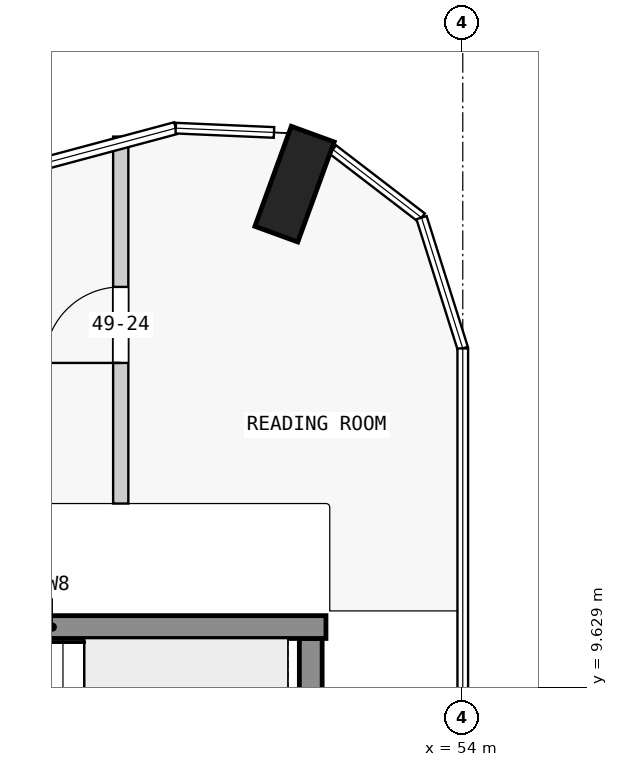
"""IFC4 building model, lengths in metres.
Left out: names, types, materials, properties, quantities, classifications, styles, units other than length and angle.
Written with IfcOpenShell. Run it as: python <this file> out.ifc"""

import sys

from ifc_helpers import new_model, si_unit, direction, frame, frame_2d, origin, origin_2d, place, context, subcontext, project, spatial, rectangle, extrude, element, fill, save


model = new_model("IFC4")
c1 = context("Model", 3, precision=1e-05, world=origin(), true_north=direction((0.0, 1.0)))
c2 = subcontext(c1, "Body", "Model", "MODEL_VIEW")
j1 = project(units=[si_unit("LENGTHUNIT", "METRE"), si_unit("PLANEANGLEUNIT", "RADIAN")], contexts=[c1])
p1 = place(None, origin())
s1 = spatial("IfcSite", under=j1, at=p1, CompositionType="ELEMENT")
p2 = place(p1, origin())
s2 = spatial("IfcBuilding", under=s1, at=p2, CompositionType="ELEMENT")
p3 = place(p2, frame((0.0, 0.0, 190.9)))
s3 = spatial("IfcBuildingStorey", under=s2, at=p3, CompositionType="ELEMENT", Elevation=190.9)
p4 = place(p3, frame((51.787, 16.252, 0.0), z_axis=(0.0, 0.0, 1.0), x_axis=(-0.939664280925, 0.342097996418, 0.0)))
e1 = element("IfcColumn", 1, at=p4, inside=s3, PredefinedType="COLUMN", context=c2, shape_type="SweptSolid", body=[
    extrude(rectangle(XDim=0.6, YDim=1.4, at=origin_2d()), origin(), (0.0, 0.0, 1.0), 3.5),
])
p5 = place(p3, frame((52.0, 7.725, 0.0), z_axis=(0.0, 0.0, 1.0), x_axis=(0.0, 1.0, 0.0)))
e2 = element("IfcWall", 2, at=p5, inside=s3, PredefinedType="SHEAR", context=c2, shape_type="SweptSolid", body=[
    extrude(rectangle(XDim=2.55, YDim=0.3, at=frame_2d((1.275, 0.0))), origin(), (0.0, 0.0, 1.0), 3.5),
])
p6 = place(p3, frame((45.0, 10.425, 0.0), z_axis=(0.0, 0.0, 1.0), x_axis=(1.0, 0.0, 0.0)))
e3 = element("IfcWall", 3, at=p6, inside=s3, PredefinedType="SHEAR", context=c2, shape_type="SweptSolid", body=[
    extrude(rectangle(XDim=7.2, YDim=0.3, at=frame_2d((3.6, 0.0))), origin(), (0.0, 0.0, 1.0), 3.5),
])
p7 = place(p3, frame((49.5, 12.05, 0.0), z_axis=(0.0, 0.0, 1.0), x_axis=(0.0, 1.0, 0.0)))
e4 = element("IfcWall", 4, at=p7, inside=s3, PredefinedType="PARTITIONING", context=c2, shape_type="SweptSolid", body=[
    extrude(rectangle(XDim=4.828, YDim=0.2, at=frame_2d((2.414, 0.0))), origin(), (0.0, 0.0, 1.0), 3.25),
])
p8 = place(p7, frame((1.85, 0.0, 0.0)))
e5 = element("IfcOpeningElement", 5, at=p8, cuts=e4, PredefinedType="OPENING", context=c2, shape_type="SweptSolid", body=[
    extrude(rectangle(XDim=1.0, YDim=2.1, at=frame_2d((0.5, 1.05))), frame((0.0, 0.11, 0.0), z_axis=(0.0, -1.0, 0.0), x_axis=(1.0, 0.0, 0.0)), (0.0, 0.0, 1.0), 0.22),
])
p9 = place(p8, origin())
e6 = element("IfcDoor", 6, at=p9, inside=s3, OperationType="SINGLE_SWING_LEFT", PredefinedType="DOOR", context=c2, shape_type="SweptSolid", body=[
    extrude(rectangle(XDim=1.0, YDim=2.1, at=frame_2d((0.5, 1.05))), frame((0.0, 0.025, 0.0), z_axis=(0.0, -1.0, 0.0), x_axis=(1.0, 0.0, 0.0)), (0.0, 0.0, 1.0), 0.05),
])
fill(e5, e6)
save(model, sys.argv[1])
